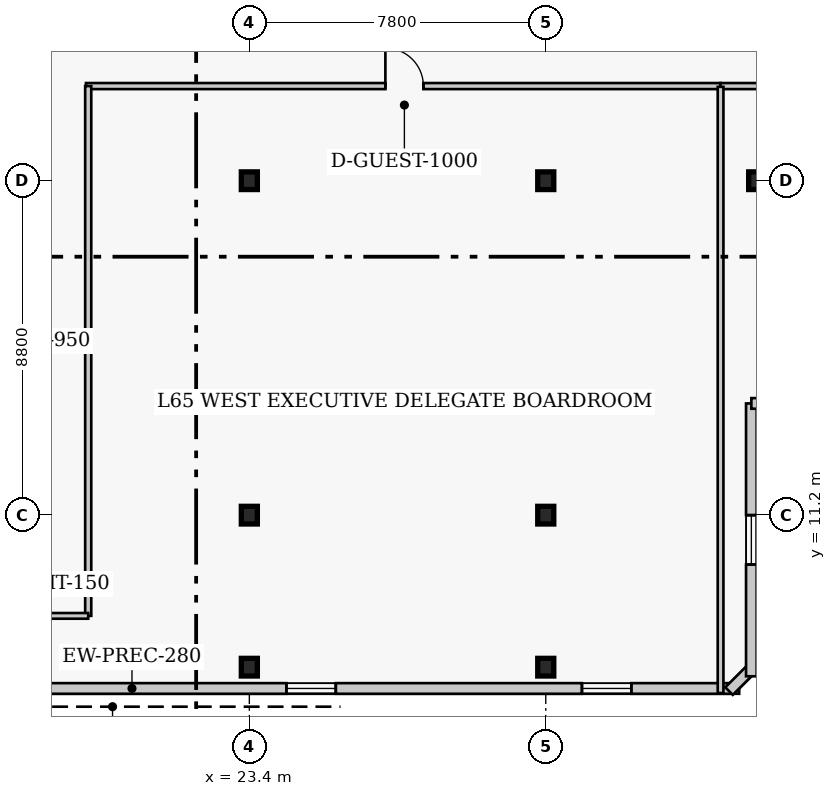
"""IFC4 building model, lengths in metres.
Left out: names, types, materials, properties, quantities, classifications, styles, units other than length and angle.
Written with IfcOpenShell. Run it as: python <this file> out.ifc"""

import sys

from ifc_helpers import new_model, si_unit, direction, frame, frame_2d, origin, origin_2d, place, context, subcontext, project, spatial, rectangle, i_section, extrude, element, fill, save


model = new_model("IFC4")
c1 = context("Model", 3, precision=1e-05, world=origin(), true_north=direction((0.0, 1.0)))
c2 = subcontext(c1, "Body", "Model", "MODEL_VIEW")
j1 = project(units=[si_unit("LENGTHUNIT", "METRE"), si_unit("PLANEANGLEUNIT", "RADIAN")], contexts=[c1])
p1 = place(None, origin())
s1 = spatial("IfcSite", under=j1, at=p1, CompositionType="ELEMENT")
p2 = place(p1, origin())
s2 = spatial("IfcBuilding", under=s1, at=p2, CompositionType="ELEMENT")
p3 = place(p2, frame((0.0, 0.0, 261.4)))
s3 = spatial("IfcBuildingStorey", under=s2, at=p3, CompositionType="ELEMENT", Elevation=261.4)
for number, where, z_axis, x_axis in (
    (1, (23.4, 11.2, 0.0), (0.0, 0.0, 1.0), (1.0, 0.0, 0.0)),
    (2, (23.4, 20.0, 0.0), (0.0, 0.0, 1.0), (1.0, 0.0, 0.0)),
    (3, (31.2, 11.2, 0.0), (0.0, 0.0, 1.0), (1.0, 0.0, 0.0)),
    (4, (31.2, 20.0, 0.0), (0.0, 0.0, 1.0), (1.0, 0.0, 0.0)),
    (5, (36.75, 20.0, 0.0), (0.0, 0.0, 1.0), (1.0, 0.0, 0.0)),
    (6, (23.4, 7.2, 0.0), (0.0, 0.0, 1.0), (1.0, 0.0, 0.0)),
    (7, (31.2, 7.2, 0.0), (0.0, 0.0, 1.0), (1.0, 0.0, 0.0)),
):
    element("IfcColumn", number, at=place(p3, frame(where, z_axis=z_axis, x_axis=x_axis)), inside=s3, PredefinedType="COLUMN", context=c2, shape_type="SweptSolid", body=[
        extrude(i_section(OverallWidth=0.422, OverallDepth=0.465, WebThickness=0.045, FlangeThickness=0.073, FilletRadius=0.017, at=origin_2d()), origin(), (0.0, 0.0, 1.0), 4.0),
    ])
p4 = place(p3, frame((11.46, 6.64, 0.0), z_axis=(0.0, 0.0, 1.0), x_axis=(1.0, 0.0, 0.0)))
e8 = element("IfcWall", 8, at=p4, inside=s3, PredefinedType="SOLIDWALL", context=c2, shape_type="SweptSolid", body=[
    extrude(rectangle(XDim=24.83, YDim=0.28, at=frame_2d((12.415, 0.0))), origin(), (0.0, 0.0, 1.0), 3.76),
])
p5 = place(p4, frame((3.488, 0.0, 0.85)))
e9 = element("IfcOpeningElement", 9, at=p5, cuts=e8, PredefinedType="OPENING", context=c2, shape_type="SweptSolid", body=[
    extrude(rectangle(XDim=1.3, YDim=1.7, at=frame_2d((0.65, 0.85))), frame((0.0, 0.15, 0.0), z_axis=(0.0, -1.0, 0.0), x_axis=(1.0, 0.0, 0.0)), (0.0, 0.0, 1.0), 0.3),
])
p6 = place(p4, frame((12.915, 0.0, 0.85)))
e10 = element("IfcOpeningElement", 10, at=p6, cuts=e8, PredefinedType="OPENING", context=c2, shape_type="SweptSolid", body=[
    extrude(rectangle(XDim=1.3, YDim=1.7, at=frame_2d((0.65, 0.85))), frame((0.0, 0.15, 0.0), z_axis=(0.0, -1.0, 0.0), x_axis=(1.0, 0.0, 0.0)), (0.0, 0.0, 1.0), 0.3),
])
p7 = place(p4, frame((20.692, 0.0, 0.85)))
e11 = element("IfcOpeningElement", 11, at=p7, cuts=e8, PredefinedType="OPENING", context=c2, shape_type="SweptSolid", body=[
    extrude(rectangle(XDim=1.3, YDim=1.7, at=frame_2d((0.65, 0.85))), frame((0.0, 0.15, 0.0), z_axis=(0.0, -1.0, 0.0), x_axis=(1.0, 0.0, 0.0)), (0.0, 0.0, 1.0), 0.3),
])
p8 = place(p3, frame((36.023, 6.571, 0.0), z_axis=(0.0, 0.0, 1.0), x_axis=(0.707106781187, 0.707106781187, 0.0)))
e12 = element("IfcWall", 12, at=p8, inside=s3, PredefinedType="SOLIDWALL", context=c2, shape_type="SweptSolid", body=[
    extrude(rectangle(XDim=0.928, YDim=0.28, at=frame_2d((0.464, 0.0))), origin(), (0.0, 0.0, 1.0), 3.76),
])
p9 = place(p3, frame((36.61, 6.96, 0.0), z_axis=(0.0, 0.0, 1.0), x_axis=(0.0, 1.0, 0.0)))
e13 = element("IfcWall", 13, at=p9, inside=s3, PredefinedType="SOLIDWALL", context=c2, shape_type="SweptSolid", body=[
    extrude(rectangle(XDim=7.18, YDim=0.28, at=frame_2d((3.59, 0.0))), origin(), (0.0, 0.0, 1.0), 3.76),
])
p10 = place(p9, frame((2.94, 0.0, 0.85)))
e14 = element("IfcOpeningElement", 14, at=p10, cuts=e13, PredefinedType="OPENING", context=c2, shape_type="SweptSolid", body=[
    extrude(rectangle(XDim=1.3, YDim=1.7, at=frame_2d((0.65, 0.85))), frame((0.0, 0.15, 0.0), z_axis=(0.0, -1.0, 0.0), x_axis=(1.0, 0.0, 0.0)), (0.0, 0.0, 1.0), 0.3),
])
p11 = place(p3, frame((36.61, 14.14, 0.0), z_axis=(0.0, 0.0, 1.0), x_axis=(1.0, 0.0, 0.0)))
e15 = element("IfcWall", 15, at=p11, inside=s3, PredefinedType="SOLIDWALL", context=c2, shape_type="SweptSolid", body=[
    extrude(rectangle(XDim=4.78, YDim=0.28, at=frame_2d((2.39, 0.0))), origin(), (0.0, 0.0, 1.0), 3.76),
])
p12 = place(p11, frame((1.74, 0.0, 0.85)))
e16 = element("IfcOpeningElement", 16, at=p12, cuts=e15, PredefinedType="OPENING", context=c2, shape_type="SweptSolid", body=[
    extrude(rectangle(XDim=1.3, YDim=1.7, at=frame_2d((0.65, 0.85))), frame((0.0, 0.15, 0.0), z_axis=(0.0, -1.0, 0.0), x_axis=(1.0, 0.0, 0.0)), (0.0, 0.0, 1.0), 0.3),
])
p13 = place(p3, frame((19.1, 22.49, 0.0), z_axis=(0.0, 0.0, 1.0), x_axis=(1.0, 0.0, 0.0)))
e17 = element("IfcWall", 17, at=p13, inside=s3, PredefinedType="PARTITIONING", context=c2, shape_type="SweptSolid", body=[
    extrude(rectangle(XDim=16.7, YDim=0.16, at=frame_2d((8.35, 0.0))), origin(), (0.0, 0.0, 1.0), 3.76),
])
p14 = place(p13, frame((7.88, 0.0, 0.0)))
e18 = element("IfcOpeningElement", 18, at=p14, cuts=e17, PredefinedType="OPENING", context=c2, shape_type="SweptSolid", body=[
    extrude(rectangle(XDim=1.0, YDim=2.15, at=frame_2d((0.5, 1.075))), frame((0.0, 0.09, 0.0), z_axis=(0.0, -1.0, 0.0), x_axis=(1.0, 0.0, 0.0)), (0.0, 0.0, 1.0), 0.18),
])
p15 = place(p3, frame((35.8, 22.49, 0.0), z_axis=(0.0, 0.0, 1.0), x_axis=(1.0, 0.0, 0.0)))
e19 = element("IfcWall", 19, at=p15, inside=s3, PredefinedType="PARTITIONING", context=c2, shape_type="SweptSolid", body=[
    extrude(rectangle(XDim=25.21, YDim=0.16, at=frame_2d((12.605, 0.0))), origin(), (0.0, 0.0, 1.0), 3.76),
])
p16 = place(p15, frame((5.522, 0.0, 0.0)))
e20 = element("IfcOpeningElement", 20, at=p16, cuts=e19, PredefinedType="OPENING", context=c2, shape_type="SweptSolid", body=[
    extrude(rectangle(XDim=1.0, YDim=2.15, at=frame_2d((0.5, 1.075))), frame((0.0, 0.09, 0.0), z_axis=(0.0, -1.0, 0.0), x_axis=(1.0, 0.0, 0.0)), (0.0, 0.0, 1.0), 0.18),
])
p17 = place(p15, frame((18.198, 0.0, 0.0)))
e21 = element("IfcOpeningElement", 21, at=p17, cuts=e19, PredefinedType="OPENING", context=c2, shape_type="SweptSolid", body=[
    extrude(rectangle(XDim=0.95, YDim=2.1, at=frame_2d((0.475, 1.05))), frame((0.0, 0.09, 0.0), z_axis=(0.0, -1.0, 0.0), x_axis=(1.0, 0.0, 0.0)), (0.0, 0.0, 1.0), 0.18),
])
p18 = place(p15, frame((23.665, 0.0, 0.0)))
e22 = element("IfcOpeningElement", 22, at=p18, cuts=e19, PredefinedType="OPENING", context=c2, shape_type="SweptSolid", body=[
    extrude(rectangle(XDim=0.95, YDim=2.1, at=frame_2d((0.475, 1.05))), frame((0.0, 0.09, 0.0), z_axis=(0.0, -1.0, 0.0), x_axis=(1.0, 0.0, 0.0)), (0.0, 0.0, 1.0), 0.18),
])
p19 = place(p3, frame((19.16, 8.55, 0.0), z_axis=(0.0, 0.0, 1.0), x_axis=(0.0, 1.0, 0.0)))
e23 = element("IfcWall", 23, at=p19, inside=s3, PredefinedType="PARTITIONING", context=c2, shape_type="SweptSolid", body=[
    extrude(rectangle(XDim=13.94, YDim=0.16, at=frame_2d((6.97, 0.0))), origin(), (0.0, 0.0, 1.0), 3.76),
])
p20 = place(p3, frame((16.94, 8.55, 0.0), z_axis=(0.0, 0.0, 1.0), x_axis=(1.0, 0.0, 0.0)))
e24 = element("IfcWall", 24, at=p20, inside=s3, PredefinedType="PARTITIONING", context=c2, shape_type="SweptSolid", body=[
    extrude(rectangle(XDim=2.22, YDim=0.15, at=frame_2d((1.11, 0.0))), origin(), (0.0, 0.0, 1.0), 3.76),
])
p21 = place(p3, frame((35.8, 6.52, 0.0), z_axis=(0.0, 0.0, 1.0), x_axis=(0.0, 1.0, 0.0)))
e25 = element("IfcWall", 25, at=p21, inside=s3, PredefinedType="PARTITIONING", context=c2, shape_type="SweptSolid", body=[
    extrude(rectangle(XDim=15.95, YDim=0.15, at=frame_2d((7.975, 0.0))), origin(), (0.0, 0.0, 1.0), 3.76),
])
p22 = place(p6, origin())
e26 = element("IfcWindow", 26, at=p22, inside=s3, PartitioningType="SINGLE_PANEL", PredefinedType="WINDOW", context=c2, shape_type="SweptSolid", body=[
    extrude(rectangle(XDim=1.3, YDim=1.7, at=frame_2d((0.65, 0.85))), frame((0.0, 0.03, 0.0), z_axis=(0.0, -1.0, 0.0), x_axis=(1.0, 0.0, 0.0)), (0.0, 0.0, 1.0), 0.06),
])
fill(e10, e26)
p23 = place(p7, origin())
e27 = element("IfcWindow", 27, at=p23, inside=s3, PartitioningType="SINGLE_PANEL", PredefinedType="WINDOW", context=c2, shape_type="SweptSolid", body=[
    extrude(rectangle(XDim=1.3, YDim=1.7, at=frame_2d((0.65, 0.85))), frame((0.0, 0.03, 0.0), z_axis=(0.0, -1.0, 0.0), x_axis=(1.0, 0.0, 0.0)), (0.0, 0.0, 1.0), 0.06),
])
fill(e11, e27)
p24 = place(p10, origin())
e28 = element("IfcWindow", 28, at=p24, inside=s3, PartitioningType="SINGLE_PANEL", PredefinedType="WINDOW", context=c2, shape_type="SweptSolid", body=[
    extrude(rectangle(XDim=1.3, YDim=1.7, at=frame_2d((0.65, 0.85))), frame((0.0, 0.03, 0.0), z_axis=(0.0, -1.0, 0.0), x_axis=(1.0, 0.0, 0.0)), (0.0, 0.0, 1.0), 0.06),
])
fill(e14, e28)
p25 = place(p14, origin())
e29 = element("IfcDoor", 29, at=p25, inside=s3, OperationType="SINGLE_SWING_LEFT", PredefinedType="DOOR", context=c2, shape_type="SweptSolid", body=[
    extrude(rectangle(XDim=1.0, YDim=2.15, at=frame_2d((0.5, 1.075))), frame((0.0, 0.025, 0.0), z_axis=(0.0, -1.0, 0.0), x_axis=(1.0, 0.0, 0.0)), (0.0, 0.0, 1.0), 0.05),
])
fill(e18, e29)
save(model, sys.argv[1])
